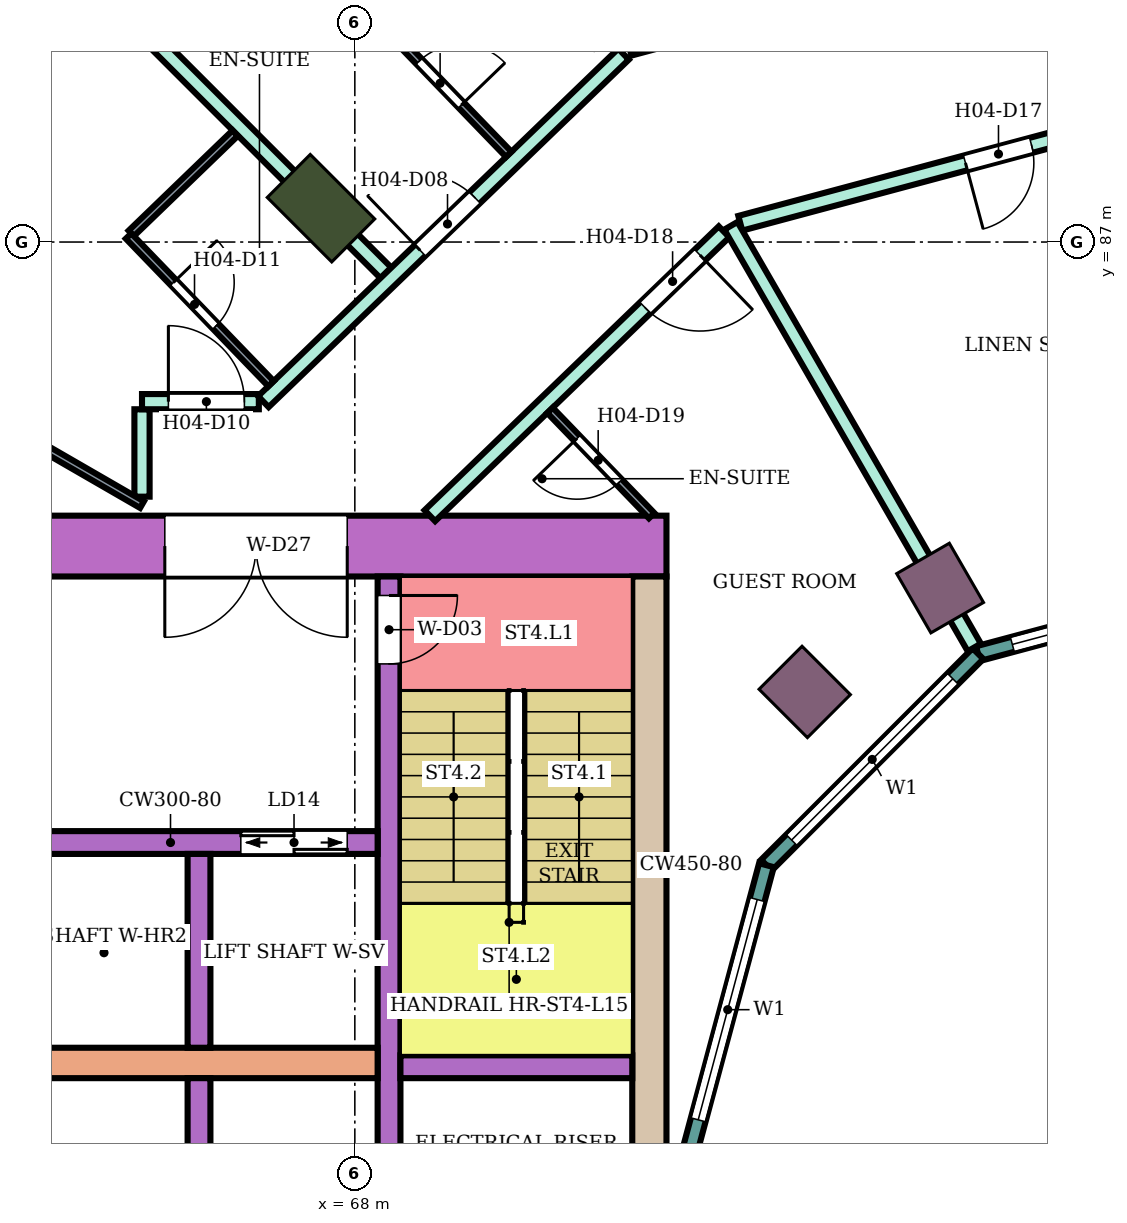
"""IFC4 building model, lengths in metres.
Left out: names, types, materials, properties, quantities, classifications, styles, units other than length and angle.
Written with IfcOpenShell. Run it as: python <this file> out.ifc"""

import sys

from ifc_helpers import new_model, si_unit, direction, frame, frame_2d, origin, origin_2d, place, context, subcontext, project, spatial, rectangle, extrude, element, fill, save


model = new_model("IFC4")
c1 = context("Model", 3, precision=1e-05, world=origin(), true_north=direction((0.0, 1.0)))
c2 = subcontext(c1, "Body", "Model", "MODEL_VIEW")
j1 = project(units=[si_unit("LENGTHUNIT", "METRE"), si_unit("PLANEANGLEUNIT", "RADIAN")], contexts=[c1])
p1 = place(None, origin())
s1 = spatial("IfcSite", under=j1, at=p1, CompositionType="ELEMENT")
p2 = place(p1, origin())
s2 = spatial("IfcBuilding", under=s1, at=p2, CompositionType="ELEMENT")
p3 = place(p2, frame((0.0, 0.0, 66.8)))
s3 = spatial("IfcBuildingStorey", under=s2, at=p3, CompositionType="ELEMENT", Elevation=66.8)
p4 = place(p3, frame((67.555, 87.445, 0.0), z_axis=(0.0, 0.0, 1.0), x_axis=(-0.707106781187, 0.707106781187, 0.0)))
e1 = element("IfcColumn", 1, at=p4, inside=s3, PredefinedType="COLUMN", context=c2, shape_type="SweptSolid", body=[
    extrude(rectangle(XDim=1.2, YDim=0.8, at=origin_2d()), origin(), (0.0, 0.0, 1.0), 3.8),
])
for number, where, z_axis, x_axis in (
    (2, (75.7, 82.448, 0.0), (0.0, 0.0, 1.0), (-0.5, 0.866, 0.0)),
    (3, (73.919, 81.081, 0.0), (0.0, 0.0, 1.0), (-0.707, 0.707, 0.0)),
):
    element("IfcColumn", number, at=place(p3, frame(where, z_axis=z_axis, x_axis=x_axis)), inside=s3, PredefinedType="COLUMN", context=c2, shape_type="SweptSolid", body=[
        extrude(rectangle(XDim=0.9, YDim=0.8, at=origin_2d()), origin(), (0.0, 0.0, 1.0), 3.8),
    ])
p5 = place(p3, frame((64.09, 90.91, 0.0), z_axis=(0.0, 0.0, 1.0), x_axis=(-0.707106781187, 0.707106781187, 0.0)))
e4 = element("IfcColumn", 4, at=p5, inside=s3, PredefinedType="COLUMN", context=c2, shape_type="SweptSolid", body=[
    extrude(rectangle(XDim=1.8, YDim=2.4, at=origin_2d()), origin(), (0.0, 0.0, 1.0), 3.8),
])
p6 = place(p3, frame((72.1, 83.0, 0.0), z_axis=(0.0, 0.0, 1.0), x_axis=(-1.0, 0.0, 0.0)))
e5 = element("IfcWall", 5, at=p6, inside=s3, PredefinedType="SHEAR", context=c2, shape_type="SweptSolid", body=[
    extrude(rectangle(XDim=14.7, YDim=0.8, at=frame_2d((7.35, 0.0))), origin(), (0.0, 0.0, 1.0), 3.48),
])
p7 = place(p6, frame((4.2, 0.0, 0.0)))
e6 = element("IfcOpeningElement", 6, at=p7, cuts=e5, PredefinedType="OPENING", context=c2, shape_type="SweptSolid", body=[
    extrude(rectangle(XDim=2.4, YDim=2.4, at=frame_2d((1.2, 1.2))), frame((0.0, 0.41, 0.0), z_axis=(0.0, -1.0, 0.0), x_axis=(1.0, 0.0, 0.0)), (0.0, 0.0, 1.0), 0.82),
])
p8 = place(p3, frame((71.875, 82.6, 0.0), z_axis=(0.0, 0.0, 1.0), x_axis=(0.0, -1.0, 0.0)))
e7 = element("IfcWall", 7, at=p8, inside=s3, PredefinedType="SHEAR", context=c2, shape_type="SweptSolid", body=[
    extrude(rectangle(XDim=7.6, YDim=0.45, at=frame_2d((3.8, 0.0))), origin(), (0.0, 0.0, 1.0), 3.48),
])
p9 = place(p3, frame((68.45, 82.6, 0.0), z_axis=(0.0, 0.0, 1.0), x_axis=(0.0, -1.0, 0.0)))
e8 = element("IfcWall", 8, at=p9, inside=s3, PredefinedType="SHEAR", context=c2, shape_type="SweptSolid", body=[
    extrude(rectangle(XDim=7.6, YDim=0.3, at=frame_2d((3.8, 0.0))), origin(), (0.0, 0.0, 1.0), 3.48),
])
p10 = place(p9, frame((0.25, 0.0, 0.0)))
e9 = element("IfcOpeningElement", 9, at=p10, cuts=e8, PredefinedType="OPENING", context=c2, shape_type="SweptSolid", body=[
    extrude(rectangle(XDim=0.9, YDim=2.1, at=frame_2d((0.45, 1.05))), frame((0.0, 0.16, 0.0), z_axis=(0.0, -1.0, 0.0), x_axis=(1.0, 0.0, 0.0)), (0.0, 0.0, 1.0), 0.32),
])
p11 = place(p3, frame((71.65, 76.15, 0.0), z_axis=(0.0, 0.0, 1.0), x_axis=(-1.0, 0.0, 0.0)))
e10 = element("IfcWall", 10, at=p11, inside=s3, PredefinedType="SHEAR", context=c2, shape_type="SweptSolid", body=[
    extrude(rectangle(XDim=3.05, YDim=0.3, at=frame_2d((1.525, 0.0))), origin(), (0.0, 0.0, 1.0), 3.48),
])
p12 = place(p3, frame((68.3, 76.2, 0.0), z_axis=(0.0, 0.0, 1.0), x_axis=(-1.0, 0.0, 0.0)))
e11 = element("IfcWall", 11, at=p12, inside=s3, PredefinedType="SHEAR", context=c2, shape_type="SweptSolid", body=[
    extrude(rectangle(XDim=10.9, YDim=0.4, at=frame_2d((5.45, 0.0))), origin(), (0.0, 0.0, 1.0), 3.48),
])
p13 = place(p3, frame((68.3, 79.1, 0.0), z_axis=(0.0, 0.0, 1.0), x_axis=(-1.0, 0.0, 0.0)))
e12 = element("IfcWall", 12, at=p13, inside=s3, PredefinedType="SHEAR", context=c2, shape_type="SweptSolid", body=[
    extrude(rectangle(XDim=10.9, YDim=0.3, at=frame_2d((5.45, 0.0))), origin(), (0.0, 0.0, 1.0), 3.48),
])
p14 = place(p13, frame((0.4, 0.0, 0.0)))
e13 = element("IfcOpeningElement", 13, at=p14, cuts=e12, PredefinedType="OPENING", context=c2, shape_type="SweptSolid", body=[
    extrude(rectangle(XDim=1.4, YDim=2.1, at=frame_2d((0.7, 1.05))), frame((0.0, 0.16, 0.0), z_axis=(0.0, -1.0, 0.0), x_axis=(1.0, 0.0, 0.0)), (0.0, 0.0, 1.0), 0.32),
])
p15 = place(p13, frame((5.4, 0.0, 0.0)))
e14 = element("IfcOpeningElement", 14, at=p15, cuts=e12, PredefinedType="OPENING", context=c2, shape_type="SweptSolid", body=[
    extrude(rectangle(XDim=1.4, YDim=2.1, at=frame_2d((0.7, 1.05))), frame((0.0, 0.16, 0.0), z_axis=(0.0, -1.0, 0.0), x_axis=(1.0, 0.0, 0.0)), (0.0, 0.0, 1.0), 0.32),
])
p16 = place(p13, frame((8.1, 0.0, 0.0)))
e15 = element("IfcOpeningElement", 15, at=p16, cuts=e12, PredefinedType="OPENING", context=c2, shape_type="SweptSolid", body=[
    extrude(rectangle(XDim=1.0, YDim=2.1, at=frame_2d((0.5, 1.05))), frame((0.0, 0.16, 0.0), z_axis=(0.0, -1.0, 0.0), x_axis=(1.0, 0.0, 0.0)), (0.0, 0.0, 1.0), 0.32),
])
for number, where, z_axis, x_axis in (
    (16, (65.95, 76.0, 0.0), (0.0, 0.0, 1.0), (0.0, -1.0, 0.0)),
    (17, (65.95, 78.95, 0.0), (0.0, 0.0, 1.0), (0.0, -1.0, 0.0)),
):
    element("IfcWall", number, at=place(p3, frame(where, z_axis=z_axis, x_axis=x_axis)), inside=s3, PredefinedType="SHEAR", context=c2, shape_type="SweptSolid", body=[
        extrude(rectangle(XDim=2.55, YDim=0.3, at=frame_2d((1.275, 0.0))), origin(), (0.0, 0.0, 1.0), 3.48),
    ])
p17 = place(p3, frame((80.0, 82.604, 0.0), z_axis=(0.0, 0.0, 1.0), x_axis=(-0.965933654434, -0.258789828301, 0.0)))
e18 = element("IfcWall", 18, at=p17, inside=s3, PredefinedType="NOTDEFINED", context=c2, shape_type="SweptSolid", body=[
    extrude(rectangle(XDim=3.936, YDim=0.2, at=frame_2d((1.968, 0.0))), origin(), (0.0, 0.0, 1.0), 3.8),
])
p18 = place(p17, frame((0.468, 0.0, 0.9)))
e19 = element("IfcOpeningElement", 19, at=p18, cuts=e18, PredefinedType="OPENING", context=c2, shape_type="SweptSolid", body=[
    extrude(rectangle(XDim=3.0, YDim=2.3, at=frame_2d((1.5, 1.15))), frame((0.0, 0.11, 0.0), z_axis=(0.0, -1.0, 0.0), x_axis=(1.0, 0.0, 0.0)), (0.0, 0.0, 1.0), 0.22),
])
p19 = place(p3, frame((76.198, 81.585, 0.0), z_axis=(0.0, 0.0, 1.0), x_axis=(-0.707106781187, -0.707106781187, 0.0)))
e20 = element("IfcWall", 20, at=p19, inside=s3, PredefinedType="NOTDEFINED", context=c2, shape_type="SweptSolid", body=[
    extrude(rectangle(XDim=3.936, YDim=0.2, at=frame_2d((1.968, 0.0))), origin(), (0.0, 0.0, 1.0), 3.8),
])
p20 = place(p19, frame((0.468, 0.0, 0.9)))
e21 = element("IfcOpeningElement", 21, at=p20, cuts=e20, PredefinedType="OPENING", context=c2, shape_type="SweptSolid", body=[
    extrude(rectangle(XDim=3.0, YDim=2.3, at=frame_2d((1.5, 1.15))), frame((0.0, 0.11, 0.0), z_axis=(0.0, -1.0, 0.0), x_axis=(1.0, 0.0, 0.0)), (0.0, 0.0, 1.0), 0.22),
])
p21 = place(p3, frame((73.415, 78.802, 0.0), z_axis=(0.0, 0.0, 1.0), x_axis=(-0.258789828301, -0.965933654434, 0.0)))
e22 = element("IfcWall", 22, at=p21, inside=s3, PredefinedType="NOTDEFINED", context=c2, shape_type="SweptSolid", body=[
    extrude(rectangle(XDim=3.936, YDim=0.2, at=frame_2d((1.968, 0.0))), origin(), (0.0, 0.0, 1.0), 3.8),
])
p22 = place(p21, frame((0.468, 0.0, 0.9)))
e23 = element("IfcOpeningElement", 23, at=p22, cuts=e22, PredefinedType="OPENING", context=c2, shape_type="SweptSolid", body=[
    extrude(rectangle(XDim=3.0, YDim=2.3, at=frame_2d((1.5, 1.15))), frame((0.0, 0.11, 0.0), z_axis=(0.0, -1.0, 0.0), x_axis=(1.0, 0.0, 0.0)), (0.0, 0.0, 1.0), 0.22),
])
p23 = place(p3, frame((63.598, 91.407, 0.0), z_axis=(0.0, 0.0, 1.0), x_axis=(0.706981202484, -0.707232337591, 0.0)))
e24 = element("IfcWall", 24, at=p23, inside=s3, PredefinedType="PARTITIONING", context=c2, shape_type="SweptSolid", body=[
    extrude(rectangle(XDim=6.805, YDim=0.2, at=frame_2d((3.402, 0.0))), origin(), (0.0, 0.0, 1.0), 3.35),
])
p24 = place(p3, frame((65.2, 83.65, 0.0), z_axis=(0.0, 0.0, 1.0), x_axis=(0.0, 1.0, 0.0)))
e25 = element("IfcWall", 25, at=p24, inside=s3, PredefinedType="PARTITIONING", context=c2, shape_type="SweptSolid", body=[
    extrude(rectangle(XDim=1.15, YDim=0.2, at=frame_2d((0.575, 0.0))), origin(), (0.0, 0.0, 1.0), 3.35),
])
p25 = place(p3, frame((65.2, 84.9, 0.0), z_axis=(0.0, 0.0, 1.0), x_axis=(1.0, 0.0, 0.0)))
e26 = element("IfcWall", 26, at=p25, inside=s3, PredefinedType="PARTITIONING", context=c2, shape_type="SweptSolid", body=[
    extrude(rectangle(XDim=1.537, YDim=0.2, at=frame_2d((0.769, 0.0))), origin(), (0.0, 0.0, 1.0), 3.35),
])
p26 = place(p25, frame((0.347, 0.0, 0.0)))
e27 = element("IfcOpeningElement", 27, at=p26, cuts=e26, PredefinedType="OPENING", context=c2, shape_type="SweptSolid", body=[
    extrude(rectangle(XDim=1.0, YDim=2.1, at=frame_2d((0.5, 1.05))), frame((0.0, 0.11, 0.0), z_axis=(0.0, -1.0, 0.0), x_axis=(1.0, 0.0, 0.0)), (0.0, 0.0, 1.0), 0.22),
])
p27 = place(p3, frame((66.797, 84.9, 0.0), z_axis=(0.0, 0.0, 1.0), x_axis=(0.719692092412, 0.694293376116, 0.0)))
e28 = element("IfcWall", 28, at=p27, inside=s3, PredefinedType="PARTITIONING", context=c2, shape_type="SweptSolid", body=[
    extrude(rectangle(XDim=6.584, YDim=0.2, at=frame_2d((3.292, 0.0))), origin(), (0.0, 0.0, 1.0), 3.35),
])
p28 = place(p27, frame((2.866, 0.0, 0.0)))
e29 = element("IfcOpeningElement", 29, at=p28, cuts=e28, PredefinedType="OPENING", context=c2, shape_type="SweptSolid", body=[
    extrude(rectangle(XDim=1.0, YDim=2.1, at=frame_2d((0.5, 1.05))), frame((0.0, 0.11, 0.0), z_axis=(0.0, -1.0, 0.0), x_axis=(1.0, 0.0, 0.0)), (0.0, 0.0, 1.0), 0.22),
])
p29 = place(p3, frame((68.987, 83.4, 0.0), z_axis=(0.0, 0.0, 1.0), x_axis=(0.719591503389, 0.694397629784, 0.0)))
e30 = element("IfcWall", 30, at=p29, inside=s3, PredefinedType="PARTITIONING", context=c2, shape_type="SweptSolid", body=[
    extrude(rectangle(XDim=5.378, YDim=0.2, at=frame_2d((2.689, 0.0))), origin(), (0.0, 0.0, 1.0), 3.35),
])
p30 = place(p29, frame((3.938, 0.0, 0.0)))
e31 = element("IfcOpeningElement", 31, at=p30, cuts=e30, PredefinedType="OPENING", context=c2, shape_type="SweptSolid", body=[
    extrude(rectangle(XDim=1.0, YDim=2.1, at=frame_2d((0.5, 1.05))), frame((0.0, 0.11, 0.0), z_axis=(0.0, -1.0, 0.0), x_axis=(1.0, 0.0, 0.0)), (0.0, 0.0, 1.0), 0.22),
])
p31 = place(p3, frame((71.614, 89.55, 0.0), z_axis=(0.0, 0.0, 1.0), x_axis=(0.965982156828, 0.258608725086, 0.0)))
e32 = element("IfcWall", 32, at=p31, inside=s3, PredefinedType="PARTITIONING", context=c2, shape_type="SweptSolid", body=[
    extrude(rectangle(XDim=8.592, YDim=0.2, at=frame_2d((4.296, 0.0))), origin(), (0.0, 0.0, 1.0), 3.35),
])
p32 = place(p31, frame((4.865, 0.0, 0.0)))
e33 = element("IfcOpeningElement", 33, at=p32, cuts=e32, PredefinedType="OPENING", context=c2, shape_type="SweptSolid", body=[
    extrude(rectangle(XDim=1.0, YDim=2.1, at=frame_2d((0.5, 1.05))), frame((0.0, 0.11, 0.0), z_axis=(0.0, -1.0, 0.0), x_axis=(1.0, 0.0, 0.0)), (0.0, 0.0, 1.0), 0.22),
])
p33 = place(p31, frame((2.804, 0.0, 0.0)))
e34 = element("IfcOpeningElement", 34, at=p33, cuts=e32, PredefinedType="OPENING", context=c2, shape_type="SweptSolid", body=[
    extrude(rectangle(XDim=1.0, YDim=2.1, at=frame_2d((0.5, 1.05))), frame((0.0, 0.11, 0.0), z_axis=(0.0, -1.0, 0.0), x_axis=(1.0, 0.0, 0.0)), (0.0, 0.0, 1.0), 0.22),
])
p34 = place(p3, frame((73.071, 87.247, 0.0), z_axis=(0.0, 0.0, 1.0), x_axis=(0.965914318977, 0.258861987157, 0.0)))
e35 = element("IfcWall", 35, at=p34, inside=s3, PredefinedType="PARTITIONING", context=c2, shape_type="SweptSolid", body=[
    extrude(rectangle(XDim=7.043, YDim=0.2, at=frame_2d((3.521, 0.0))), origin(), (0.0, 0.0, 1.0), 3.35),
])
p35 = place(p34, frame((3.067, 0.0, 0.0)))
e36 = element("IfcOpeningElement", 36, at=p35, cuts=e35, PredefinedType="OPENING", context=c2, shape_type="SweptSolid", body=[
    extrude(rectangle(XDim=0.9, YDim=2.1, at=frame_2d((0.45, 1.05))), frame((0.0, 0.11, 0.0), z_axis=(0.0, -1.0, 0.0), x_axis=(1.0, 0.0, 0.0)), (0.0, 0.0, 1.0), 0.22),
])
p36 = place(p3, frame((72.948, 87.214, 0.0), z_axis=(0.0, 0.0, 1.0), x_axis=(0.499927021214, -0.866067534006, 0.0)))
e37 = element("IfcWall", 37, at=p36, inside=s3, PredefinedType="PARTITIONING", context=c2, shape_type="SweptSolid", body=[
    extrude(rectangle(XDim=6.405, YDim=0.2, at=frame_2d((3.203, 0.0))), origin(), (0.0, 0.0, 1.0), 3.35),
])
p37 = place(p3, frame((57.659, 87.899, 0.0), z_axis=(0.0, 0.0, 1.0), x_axis=(0.86602264145, -0.500004784474, 0.0)))
e38 = element("IfcWall", 38, at=p37, inside=s3, PredefinedType="PARTITIONING", context=c2, shape_type="SweptSolid", body=[
    extrude(rectangle(XDim=8.708, YDim=0.1, at=frame_2d((4.354, 0.0))), origin(), (0.0, 0.0, 1.0), 3.35),
])
p38 = place(p37, frame((3.929, 0.0, 0.0)))
e39 = element("IfcOpeningElement", 39, at=p38, cuts=e38, PredefinedType="OPENING", context=c2, shape_type="SweptSolid", body=[
    extrude(rectangle(XDim=0.9, YDim=2.1, at=frame_2d((0.45, 1.05))), frame((0.0, 0.06, 0.0), z_axis=(0.0, -1.0, 0.0), x_axis=(1.0, 0.0, 0.0)), (0.0, 0.0, 1.0), 0.12),
])
p39 = place(p3, frame((65.059, 87.114, 0.0), z_axis=(0.0, 0.0, 1.0), x_axis=(0.719715847356, 0.694268751324, 0.0)))
e40 = element("IfcWall", 40, at=p39, inside=s3, PredefinedType="PARTITIONING", context=c2, shape_type="SweptSolid", body=[
    extrude(rectangle(XDim=1.9, YDim=0.1, at=frame_2d((0.95, 0.0))), origin(), (0.0, 0.0, 1.0), 3.35),
])
p40 = place(p3, frame((65.023, 87.079, 0.0), z_axis=(0.0, 0.0, 1.0), x_axis=(0.694287838235, -0.719697434815, 0.0)))
e41 = element("IfcWall", 41, at=p40, inside=s3, PredefinedType="PARTITIONING", context=c2, shape_type="SweptSolid", body=[
    extrude(rectangle(XDim=2.7, YDim=0.1, at=frame_2d((1.35, 0.0))), origin(), (0.0, 0.0, 1.0), 3.35),
])
p41 = place(p40, frame((0.85, 0.0, 0.0)))
e42 = element("IfcOpeningElement", 42, at=p41, cuts=e41, PredefinedType="OPENING", context=c2, shape_type="SweptSolid", body=[
    extrude(rectangle(XDim=0.8, YDim=2.1, at=frame_2d((0.4, 1.05))), frame((0.0, 0.06, 0.0), z_axis=(0.0, -1.0, 0.0), x_axis=(1.0, 0.0, 0.0)), (0.0, 0.0, 1.0), 0.12),
])
p42 = place(p3, frame((68.185, 90.06, 0.0), z_axis=(0.0, 0.0, 1.0), x_axis=(0.69446127412, -0.719530081892, 0.0)))
e43 = element("IfcWall", 43, at=p42, inside=s3, PredefinedType="PARTITIONING", context=c2, shape_type="SweptSolid", body=[
    extrude(rectangle(XDim=2.649, YDim=0.1, at=frame_2d((1.324, 0.0))), origin(), (0.0, 0.0, 1.0), 3.35),
])
p43 = place(p42, frame((0.95, 0.0, 0.0)))
e44 = element("IfcOpeningElement", 44, at=p43, cuts=e43, PredefinedType="OPENING", context=c2, shape_type="SweptSolid", body=[
    extrude(rectangle(XDim=0.8, YDim=2.1, at=frame_2d((0.4, 1.05))), frame((0.0, 0.06, 0.0), z_axis=(0.0, -1.0, 0.0), x_axis=(1.0, 0.0, 0.0)), (0.0, 0.0, 1.0), 0.12),
])
p44 = place(p3, frame((70.567, 84.786, 0.0), z_axis=(0.0, 0.0, 1.0), x_axis=(0.694447472534, -0.719543402368, 0.0)))
e45 = element("IfcWall", 45, at=p44, inside=s3, PredefinedType="PARTITIONING", context=c2, shape_type="SweptSolid", body=[
    extrude(rectangle(XDim=1.926, YDim=0.1, at=frame_2d((0.963, 0.0))), origin(), (0.0, 0.0, 1.0), 3.35),
])
p45 = place(p44, frame((0.513, 0.0, 0.0)))
e46 = element("IfcOpeningElement", 46, at=p45, cuts=e45, PredefinedType="OPENING", context=c2, shape_type="SweptSolid", body=[
    extrude(rectangle(XDim=0.8, YDim=2.1, at=frame_2d((0.4, 1.05))), frame((0.0, 0.06, 0.0), z_axis=(0.0, -1.0, 0.0), x_axis=(1.0, 0.0, 0.0)), (0.0, 0.0, 1.0), 0.12),
])
p46 = place(p18, origin())
e47 = element("IfcWindow", 47, at=p46, inside=s3, PartitioningType="SINGLE_PANEL", PredefinedType="WINDOW", context=c2, shape_type="SweptSolid", body=[
    extrude(rectangle(XDim=3.0, YDim=2.3, at=frame_2d((1.5, 1.15))), frame((0.0, 0.03, 0.0), z_axis=(0.0, -1.0, 0.0), x_axis=(1.0, 0.0, 0.0)), (0.0, 0.0, 1.0), 0.06),
])
fill(e19, e47)
p47 = place(p20, origin())
e48 = element("IfcWindow", 48, at=p47, inside=s3, PartitioningType="SINGLE_PANEL", PredefinedType="WINDOW", context=c2, shape_type="SweptSolid", body=[
    extrude(rectangle(XDim=3.0, YDim=2.3, at=frame_2d((1.5, 1.15))), frame((0.0, 0.03, 0.0), z_axis=(0.0, -1.0, 0.0), x_axis=(1.0, 0.0, 0.0)), (0.0, 0.0, 1.0), 0.06),
])
fill(e21, e48)
p48 = place(p22, origin())
e49 = element("IfcWindow", 49, at=p48, inside=s3, PartitioningType="SINGLE_PANEL", PredefinedType="WINDOW", context=c2, shape_type="SweptSolid", body=[
    extrude(rectangle(XDim=3.0, YDim=2.3, at=frame_2d((1.5, 1.15))), frame((0.0, 0.03, 0.0), z_axis=(0.0, -1.0, 0.0), x_axis=(1.0, 0.0, 0.0)), (0.0, 0.0, 1.0), 0.06),
])
fill(e23, e49)
p49 = place(p28, origin())
e50 = element("IfcDoor", 50, at=p49, inside=s3, OperationType="SINGLE_SWING_LEFT", PredefinedType="DOOR", context=c2, shape_type="SweptSolid", body=[
    extrude(rectangle(XDim=1.0, YDim=2.1, at=frame_2d((0.5, 1.05))), frame((0.0, 0.025, 0.0), z_axis=(0.0, -1.0, 0.0), x_axis=(1.0, 0.0, 0.0)), (0.0, 0.0, 1.0), 0.05),
])
fill(e29, e50)
p50 = place(p43, origin())
e51 = element("IfcDoor", 51, at=p50, inside=s3, OperationType="SINGLE_SWING_RIGHT", PredefinedType="DOOR", context=c2, shape_type="SweptSolid", body=[
    extrude(rectangle(XDim=0.8, YDim=2.1, at=frame_2d((0.4, 1.05))), frame((0.0, 0.025, 0.0), z_axis=(0.0, -1.0, 0.0), x_axis=(1.0, 0.0, 0.0)), (0.0, 0.0, 1.0), 0.05),
])
fill(e44, e51)
p51 = place(p26, origin())
e52 = element("IfcDoor", 52, at=p51, inside=s3, OperationType="SINGLE_SWING_LEFT", PredefinedType="DOOR", context=c2, shape_type="SweptSolid", body=[
    extrude(rectangle(XDim=1.0, YDim=2.1, at=frame_2d((0.5, 1.05))), frame((0.0, 0.025, 0.0), z_axis=(0.0, -1.0, 0.0), x_axis=(1.0, 0.0, 0.0)), (0.0, 0.0, 1.0), 0.05),
])
fill(e27, e52)
p52 = place(p41, origin())
e53 = element("IfcDoor", 53, at=p52, inside=s3, OperationType="SINGLE_SWING_LEFT", PredefinedType="DOOR", context=c2, shape_type="SweptSolid", body=[
    extrude(rectangle(XDim=0.8, YDim=2.1, at=frame_2d((0.4, 1.05))), frame((0.0, 0.025, 0.0), z_axis=(0.0, -1.0, 0.0), x_axis=(1.0, 0.0, 0.0)), (0.0, 0.0, 1.0), 0.05),
])
fill(e42, e53)
p53 = place(p35, frame((0.9, 0.0, 0.0), z_axis=(0.0, 0.0, 1.0), x_axis=(-1.0, 0.0, 0.0)))
e54 = element("IfcDoor", 54, at=p53, inside=s3, OperationType="SINGLE_SWING_RIGHT", PredefinedType="DOOR", context=c2, shape_type="SweptSolid", body=[
    extrude(rectangle(XDim=0.9, YDim=2.1, at=frame_2d((0.45, 1.05))), frame((0.0, 0.025, 0.0), z_axis=(0.0, -1.0, 0.0), x_axis=(1.0, 0.0, 0.0)), (0.0, 0.0, 1.0), 0.05),
])
fill(e36, e54)
p54 = place(p30, frame((1.0, 0.0, 0.0), z_axis=(0.0, 0.0, 1.0), x_axis=(-1.0, 0.0, 0.0)))
e55 = element("IfcDoor", 55, at=p54, inside=s3, OperationType="SINGLE_SWING_LEFT", PredefinedType="DOOR", context=c2, shape_type="SweptSolid", body=[
    extrude(rectangle(XDim=1.0, YDim=2.1, at=frame_2d((0.5, 1.05))), frame((0.0, 0.025, 0.0), z_axis=(0.0, -1.0, 0.0), x_axis=(1.0, 0.0, 0.0)), (0.0, 0.0, 1.0), 0.05),
])
fill(e31, e55)
p55 = place(p45, frame((0.8, 0.0, 0.0), z_axis=(0.0, 0.0, 1.0), x_axis=(-1.0, 0.0, 0.0)))
e56 = element("IfcDoor", 56, at=p55, inside=s3, OperationType="SINGLE_SWING_RIGHT", PredefinedType="DOOR", context=c2, shape_type="SweptSolid", body=[
    extrude(rectangle(XDim=0.8, YDim=2.1, at=frame_2d((0.4, 1.05))), frame((0.0, 0.025, 0.0), z_axis=(0.0, -1.0, 0.0), x_axis=(1.0, 0.0, 0.0)), (0.0, 0.0, 1.0), 0.05),
])
fill(e46, e56)
p56 = place(p10, origin())
e57 = element("IfcDoor", 57, at=p56, inside=s3, OperationType="SINGLE_SWING_LEFT", PredefinedType="DOOR", context=c2, shape_type="SweptSolid", body=[
    extrude(rectangle(XDim=0.9, YDim=2.1, at=frame_2d((0.45, 1.05))), frame((0.0, 0.025, 0.0), z_axis=(0.0, -1.0, 0.0), x_axis=(1.0, 0.0, 0.0)), (0.0, 0.0, 1.0), 0.05),
])
fill(e9, e57)
p57 = place(p14, origin())
e58 = element("IfcDoor", 58, at=p57, inside=s3, OperationType="DOUBLE_DOOR_SLIDING", PredefinedType="DOOR", context=c2, shape_type="SweptSolid", body=[
    extrude(rectangle(XDim=1.4, YDim=2.1, at=frame_2d((0.7, 1.05))), frame((0.0, 0.025, 0.0), z_axis=(0.0, -1.0, 0.0), x_axis=(1.0, 0.0, 0.0)), (0.0, 0.0, 1.0), 0.05),
])
fill(e13, e58)
p58 = place(p7, origin())
e59 = element("IfcDoor", 59, at=p58, inside=s3, OperationType="DOUBLE_DOOR_SINGLE_SWING", PredefinedType="DOOR", context=c2, shape_type="SweptSolid", body=[
    extrude(rectangle(XDim=2.4, YDim=2.4, at=frame_2d((1.2, 1.2))), frame((0.0, 0.025, 0.0), z_axis=(0.0, -1.0, 0.0), x_axis=(1.0, 0.0, 0.0)), (0.0, 0.0, 1.0), 0.05),
])
fill(e6, e59)
save(model, sys.argv[1])
